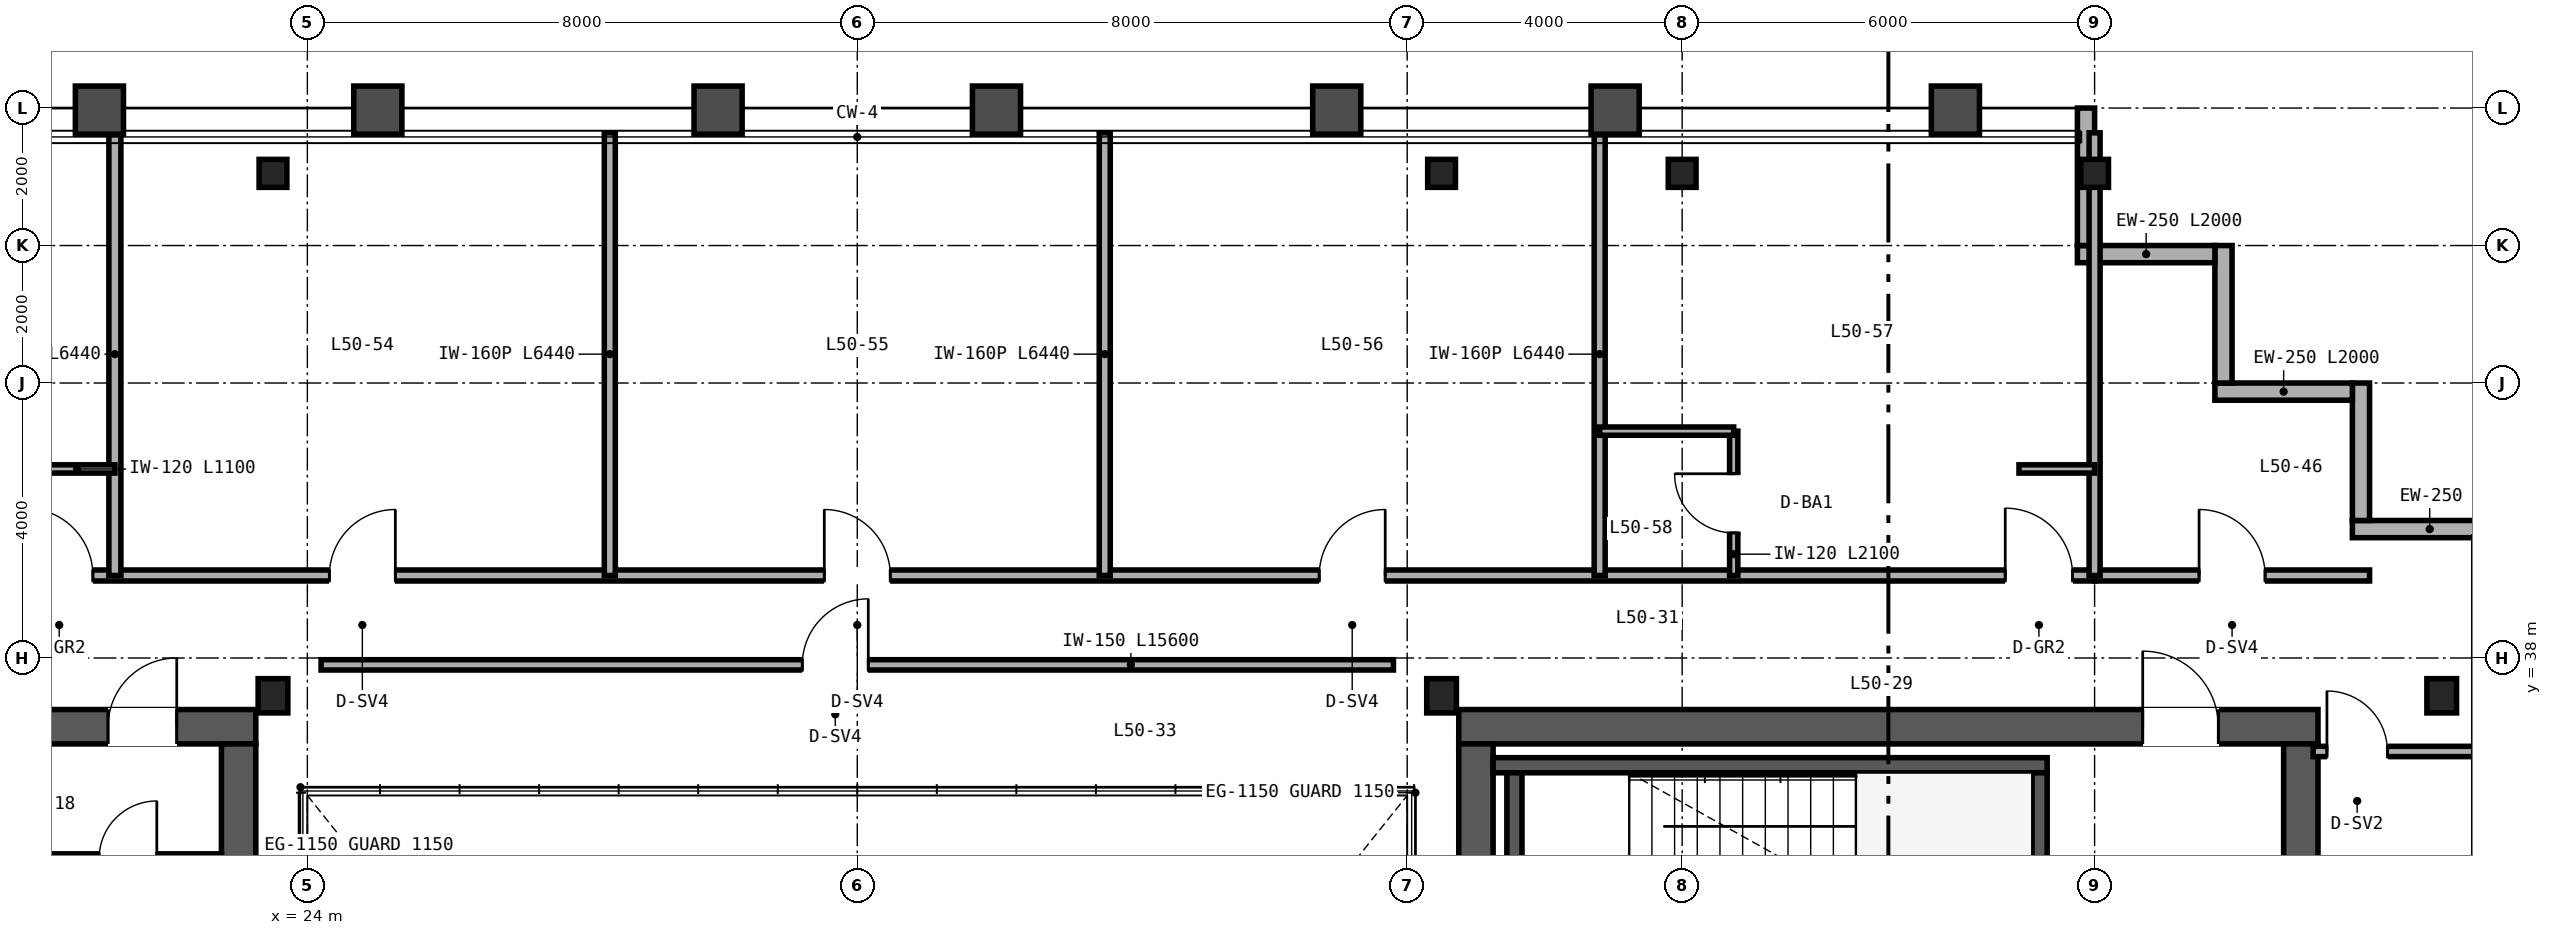
"""IFC4 building model, lengths in metres.
Left out: names, types, materials, properties, quantities, classifications, styles, units other than length and angle.
Written with IfcOpenShell. Run it as: python <this file> out.ifc"""

import sys

from ifc_helpers import new_model, si_unit, direction, frame, frame_2d, origin, origin_2d, place, context, subcontext, project, spatial, rectangle, i_section, extrude, source, transform, mapped, element, fill, save


model = new_model("IFC4")
c1 = context("Model", 3, precision=1e-05, world=origin(), true_north=direction((0.0, 1.0)))
c2 = subcontext(c1, "Body", "Model", "MODEL_VIEW")
j1 = project(units=[si_unit("LENGTHUNIT", "METRE"), si_unit("PLANEANGLEUNIT", "RADIAN")], contexts=[c1])
p1 = place(None, origin())
s1 = spatial("IfcSite", under=j1, at=p1, CompositionType="ELEMENT")
p2 = place(p1, origin())
s2 = spatial("IfcBuilding", under=s1, at=p2, CompositionType="ELEMENT")
p3 = place(p2, frame((0.0, 0.0, 199.2)))
s3 = spatial("IfcBuildingStorey", under=s2, at=p3, CompositionType="ELEMENT", Elevation=199.2)
p4 = place(p3, frame((10.75, 37.0, 0.0), z_axis=(0.0, 0.0, 1.0), x_axis=(1.0, 0.0, 0.0)))
e1 = element("IfcWall", 1, at=p4, inside=s3, PredefinedType="SHEAR", context=c2, shape_type="SweptSolid", body=[
    extrude(rectangle(XDim=12.5, YDim=0.5, at=frame_2d((6.25, 0.0))), origin(), (0.0, 0.0, 1.0), 3.37),
])
p5 = place(p4, frame((10.35, 0.0, 0.0)))
e2 = element("IfcOpeningElement", 2, at=p5, cuts=e1, PredefinedType="OPENING", context=c2, shape_type="SweptSolid", body=[
    extrude(rectangle(XDim=1.0, YDim=2.15, at=frame_2d((0.5, 1.075))), frame((0.0, 0.26, 0.0), z_axis=(0.0, -1.0, 0.0), x_axis=(1.0, 0.0, 0.0)), (0.0, 0.0, 1.0), 0.52),
])
p6 = place(p3, frame((23.0, 15.25, 0.0), z_axis=(0.0, 0.0, 1.0), x_axis=(0.0, 1.0, 0.0)))
e3 = element("IfcWall", 3, at=p6, inside=s3, PredefinedType="SHEAR", context=c2, shape_type="SweptSolid", body=[
    extrude(rectangle(XDim=21.5, YDim=0.5, at=frame_2d((10.75, 0.0))), origin(), (0.0, 0.0, 1.0), 3.37),
])
p7 = place(p3, frame((40.75, 37.0, 0.0), z_axis=(0.0, 0.0, 1.0), x_axis=(1.0, 0.0, 0.0)))
e4 = element("IfcWall", 4, at=p7, inside=s3, PredefinedType="SHEAR", context=c2, shape_type="SweptSolid", body=[
    extrude(rectangle(XDim=12.5, YDim=0.5, at=frame_2d((6.25, 0.0))), origin(), (0.0, 0.0, 1.0), 3.37),
])
p8 = place(p7, frame((9.95, 0.0, 0.0)))
e5 = element("IfcOpeningElement", 5, at=p8, cuts=e4, PredefinedType="OPENING", context=c2, shape_type="SweptSolid", body=[
    extrude(rectangle(XDim=1.1, YDim=2.15, at=frame_2d((0.55, 1.075))), frame((0.0, 0.26, 0.0), z_axis=(0.0, -1.0, 0.0), x_axis=(1.0, 0.0, 0.0)), (0.0, 0.0, 1.0), 0.52),
])
for number, where, z_axis, x_axis in (
    (6, (41.0, 15.25, 0.0), (0.0, 0.0, 1.0), (0.0, 1.0, 0.0)),
    (7, (53.0, 15.25, 0.0), (0.0, 0.0, 1.0), (0.0, 1.0, 0.0)),
):
    element("IfcWall", number, at=place(p3, frame(where, z_axis=z_axis, x_axis=x_axis)), inside=s3, PredefinedType="SHEAR", context=c2, shape_type="SweptSolid", body=[
        extrude(rectangle(XDim=21.5, YDim=0.5, at=frame_2d((10.75, 0.0))), origin(), (0.0, 0.0, 1.0), 3.37),
    ])
p9 = place(p3, frame((41.25, 36.44, 0.0), z_axis=(0.0, 0.0, 1.0), x_axis=(1.0, 0.0, 0.0)))
e8 = element("IfcWall", 8, at=p9, inside=s3, PredefinedType="SHEAR", context=c2, shape_type="SweptSolid", body=[
    extrude(rectangle(XDim=8.06, YDim=0.22, at=frame_2d((4.03, 0.0))), origin(), (0.0, 0.0, 1.0), 3.4),
])
for number, where, z_axis, x_axis in (
    (9, (41.56, 33.05, 0.0), (0.0, 0.0, 1.0), (0.0, 1.0, 0.0)),
    (10, (49.2, 33.05, 0.0), (0.0, 0.0, 1.0), (0.0, 1.0, 0.0)),
):
    element("IfcWall", number, at=place(p3, frame(where, z_axis=z_axis, x_axis=x_axis)), inside=s3, PredefinedType="SHEAR", context=c2, shape_type="SweptSolid", body=[
        extrude(rectangle(XDim=3.28, YDim=0.22, at=frame_2d((1.64, 0.0))), origin(), (0.0, 0.0, 1.0), 3.4),
    ])
m1 = source(origin(), c2, "Body", "SweptSolid", [
    extrude(i_section(OverallWidth=0.432, OverallDepth=0.498, WebThickness=0.056, FlangeThickness=0.089, FilletRadius=0.025, at=origin_2d()), origin(), (0.0, 0.0, 1.0), 3.37),
])
for number, where, z_axis, x_axis in (
    (11, (23.5, 37.45, 0.0), (0.0, 0.0, 1.0), (1.0, 0.0, 0.0)),
    (12, (40.5, 37.45, 0.0), (0.0, 0.0, 1.0), (1.0, 0.0, 0.0)),
    (13, (55.05, 37.45, 0.0), (0.0, 0.0, 1.0), (1.0, 0.0, 0.0)),
):
    element("IfcColumn", number, at=place(p3, frame(where, z_axis=z_axis, x_axis=x_axis)), inside=s3, PredefinedType="COLUMN", context=c2, shape_type="MappedRepresentation", body=[
        mapped(m1, transform((0.0, 0.0, 0.0), scale=1.0)),
    ])
m2 = source(origin(), c2, "Body", "SweptSolid", [
    extrude(i_section(OverallWidth=0.404, OverallDepth=0.407, WebThickness=0.027, FlangeThickness=0.044, FilletRadius=0.025, at=origin_2d()), origin(), (0.0, 0.0, 1.0), 3.37),
])
for number, where, z_axis, x_axis in (
    (14, (23.5, 45.05, 0.0), (0.0, 0.0, 1.0), (1.0, 0.0, 0.0)),
    (15, (40.5, 45.05, 0.0), (0.0, 0.0, 1.0), (1.0, 0.0, 0.0)),
    (16, (44.0, 45.05, 0.0), (0.0, 0.0, 1.0), (1.0, 0.0, 0.0)),
    (17, (50.0, 45.05, 0.0), (0.0, 0.0, 1.0), (1.0, 0.0, 0.0)),
):
    element("IfcColumn", number, at=place(p3, frame(where, z_axis=z_axis, x_axis=x_axis)), inside=s3, PredefinedType="COLUMN", context=c2, shape_type="MappedRepresentation", body=[
        mapped(m2, transform((0.0, 0.0, 0.0), scale=1.0)),
    ])
p10 = place(p3, frame((56.0, 39.875, 0.0), z_axis=(0.0, 0.0, 1.0), x_axis=(-1.0, 0.0, 0.0)))
e18 = element("IfcWall", 18, at=p10, inside=s3, PredefinedType="SOLIDWALL", context=c2, shape_type="SweptSolid", body=[
    extrude(rectangle(XDim=2.25, YDim=0.25, at=frame_2d((1.125, 0.0))), origin(), (0.0, 0.0, 1.0), 3.37),
])
for number, where, z_axis, x_axis in (
    (19, (53.875, 40.0, 0.0), (0.0, 0.0, 1.0), (0.0, 1.0, 0.0)),
    (20, (53.75, 41.875, 0.0), (0.0, 0.0, 1.0), (-1.0, 0.0, 0.0)),
    (21, (51.875, 42.0, 0.0), (0.0, 0.0, 1.0), (0.0, 1.0, 0.0)),
    (22, (51.75, 43.875, 0.0), (0.0, 0.0, 1.0), (-1.0, 0.0, 0.0)),
):
    element("IfcWall", number, at=place(p3, frame(where, z_axis=z_axis, x_axis=x_axis)), inside=s3, PredefinedType="SOLIDWALL", context=c2, shape_type="SweptSolid", body=[
        extrude(rectangle(XDim=2.0, YDim=0.25, at=frame_2d((1.0, 0.0))), origin(), (0.0, 0.0, 1.0), 3.37),
    ])
p11 = place(p3, frame((49.875, 44.0, 0.0), z_axis=(0.0, 0.0, 1.0), x_axis=(0.0, 1.0, 0.0)))
e23 = element("IfcWall", 23, at=p11, inside=s3, PredefinedType="SOLIDWALL", context=c2, shape_type="SweptSolid", body=[
    extrude(rectangle(XDim=2.0, YDim=0.25, at=frame_2d((1.0, 0.0))), origin(), (0.0, 0.0, 1.0), 2.677),
])
p12 = place(p3, frame((20.12, 35.08, 0.0), z_axis=(0.0, 0.0, 1.0), x_axis=(1.0, 0.0, 0.0)))
e24 = element("IfcWall", 24, at=p12, inside=s3, PredefinedType="PARTITIONING", context=c2, shape_type="SweptSolid", body=[
    extrude(rectangle(XDim=2.63, YDim=0.142, at=frame_2d((1.315, 0.0))), origin(), (0.0, 0.0, 1.0), 3.37),
])
p13 = place(p12, frame((0.85, 0.0, 0.0)))
e25 = element("IfcOpeningElement", 25, at=p13, cuts=e24, PredefinedType="OPENING", context=c2, shape_type="SweptSolid", body=[
    extrude(rectangle(XDim=0.84, YDim=2.1, at=frame_2d((0.42, 1.05))), frame((0.0, 0.081, 0.0), z_axis=(0.0, -1.0, 0.0), x_axis=(1.0, 0.0, 0.0)), (0.0, 0.0, 1.0), 0.162),
])
p14 = place(p3, frame((24.2, 37.9, 0.0), z_axis=(0.0, 0.0, 1.0), x_axis=(1.0, 0.0, 0.0)))
e26 = element("IfcWall", 26, at=p14, inside=s3, PredefinedType="PARTITIONING", context=c2, shape_type="SweptSolid", body=[
    extrude(rectangle(XDim=15.6, YDim=0.15, at=frame_2d((7.8, 0.0))), origin(), (0.0, 0.0, 1.0), 3.37),
])
p15 = place(p14, frame((7.0, 0.0, 0.0)))
e27 = element("IfcOpeningElement", 27, at=p15, cuts=e26, PredefinedType="OPENING", context=c2, shape_type="SweptSolid", body=[
    extrude(rectangle(XDim=0.96, YDim=2.15, at=frame_2d((0.48, 1.075))), frame((0.0, 0.085, 0.0), z_axis=(0.0, -1.0, 0.0), x_axis=(1.0, 0.0, 0.0)), (0.0, 0.0, 1.0), 0.17),
])
p16 = place(p3, frame((53.18, 36.64, 0.0), z_axis=(0.0, 0.0, 1.0), x_axis=(1.0, 0.0, 0.0)))
e28 = element("IfcWall", 28, at=p16, inside=s3, PredefinedType="PARTITIONING", context=c2, shape_type="SweptSolid", body=[
    extrude(rectangle(XDim=2.66, YDim=0.15, at=frame_2d((1.33, 0.0))), origin(), (0.0, 0.0, 1.0), 2.753),
])
p17 = place(p16, frame((0.2, 0.0, 0.0)))
e29 = element("IfcOpeningElement", 29, at=p17, cuts=e28, PredefinedType="OPENING", context=c2, shape_type="SweptSolid", body=[
    extrude(rectangle(XDim=0.88, YDim=2.15, at=frame_2d((0.44, 1.075))), frame((0.0, 0.085, 0.0), z_axis=(0.0, -1.0, 0.0), x_axis=(1.0, 0.0, 0.0)), (0.0, 0.0, 1.0), 0.17),
])
p18 = place(p3, frame((50.0, 39.2, 0.0), z_axis=(0.0, 0.0, 1.0), x_axis=(1.0, 0.0, 0.0)))
e30 = element("IfcWall", 30, at=p18, inside=s3, PredefinedType="PARTITIONING", context=c2, shape_type="SweptSolid", body=[
    extrude(rectangle(XDim=4.0, YDim=0.16, at=frame_2d((2.0, 0.0))), origin(), (0.0, 0.0, 1.0), 3.37),
])
p19 = place(p18, frame((1.52, 0.0, 0.0)))
e31 = element("IfcOpeningElement", 31, at=p19, cuts=e30, PredefinedType="OPENING", context=c2, shape_type="SweptSolid", body=[
    extrude(rectangle(XDim=0.96, YDim=2.15, at=frame_2d((0.48, 1.075))), frame((0.0, 0.09, 0.0), z_axis=(0.0, -1.0, 0.0), x_axis=(1.0, 0.0, 0.0)), (0.0, 0.0, 1.0), 0.18),
])
p20 = place(p3, frame((14.0, 39.2, 0.0), z_axis=(0.0, 0.0, 1.0), x_axis=(1.0, 0.0, 0.0)))
e32 = element("IfcWall", 32, at=p20, inside=s3, PredefinedType="PARTITIONING", context=c2, shape_type="SweptSolid", body=[
    extrude(rectangle(XDim=36.0, YDim=0.16, at=frame_2d((18.0, 0.0))), origin(), (0.0, 0.0, 1.0), 2.913),
])
p21 = place(p20, frame((5.9, 0.0, 0.0)))
e33 = element("IfcOpeningElement", 33, at=p21, cuts=e32, PredefinedType="OPENING", context=c2, shape_type="SweptSolid", body=[
    extrude(rectangle(XDim=0.98, YDim=2.2, at=frame_2d((0.49, 1.1))), frame((0.0, 0.09, 0.0), z_axis=(0.0, -1.0, 0.0), x_axis=(1.0, 0.0, 0.0)), (0.0, 0.0, 1.0), 0.18),
])
p22 = place(p20, frame((10.32, 0.0, 0.0)))
e34 = element("IfcOpeningElement", 34, at=p22, cuts=e32, PredefinedType="OPENING", context=c2, shape_type="SweptSolid", body=[
    extrude(rectangle(XDim=0.96, YDim=2.15, at=frame_2d((0.48, 1.075))), frame((0.0, 0.09, 0.0), z_axis=(0.0, -1.0, 0.0), x_axis=(1.0, 0.0, 0.0)), (0.0, 0.0, 1.0), 0.18),
])
p23 = place(p20, frame((17.52, 0.0, 0.0)))
e35 = element("IfcOpeningElement", 35, at=p23, cuts=e32, PredefinedType="OPENING", context=c2, shape_type="SweptSolid", body=[
    extrude(rectangle(XDim=0.96, YDim=2.15, at=frame_2d((0.48, 1.075))), frame((0.0, 0.09, 0.0), z_axis=(0.0, -1.0, 0.0), x_axis=(1.0, 0.0, 0.0)), (0.0, 0.0, 1.0), 0.18),
])
p24 = place(p20, frame((24.72, 0.0, 0.0)))
e36 = element("IfcOpeningElement", 36, at=p24, cuts=e32, PredefinedType="OPENING", context=c2, shape_type="SweptSolid", body=[
    extrude(rectangle(XDim=0.96, YDim=2.15, at=frame_2d((0.48, 1.075))), frame((0.0, 0.09, 0.0), z_axis=(0.0, -1.0, 0.0), x_axis=(1.0, 0.0, 0.0)), (0.0, 0.0, 1.0), 0.18),
])
p25 = place(p20, frame((34.7, 0.0, 0.0)))
e37 = element("IfcOpeningElement", 37, at=p25, cuts=e32, PredefinedType="OPENING", context=c2, shape_type="SweptSolid", body=[
    extrude(rectangle(XDim=0.98, YDim=2.2, at=frame_2d((0.49, 1.1))), frame((0.0, 0.09, 0.0), z_axis=(0.0, -1.0, 0.0), x_axis=(1.0, 0.0, 0.0)), (0.0, 0.0, 1.0), 0.18),
])
p26 = place(p3, frame((50.0, 39.2, 0.0), z_axis=(0.0, 0.0, 1.0), x_axis=(0.0, 1.0, 0.0)))
e38 = element("IfcWall", 38, at=p26, inside=s3, PredefinedType="PARTITIONING", context=c2, shape_type="SweptSolid", body=[
    extrude(rectangle(XDim=6.44, YDim=0.16, at=frame_2d((3.22, 0.0))), origin(), (0.0, 0.0, 1.0), 2.677),
])
p27 = place(p3, frame((21.2, 39.2, 0.0), z_axis=(0.0, 0.0, 1.0), x_axis=(0.0, 1.0, 0.0)))
e39 = element("IfcWall", 39, at=p27, inside=s3, PredefinedType="PARTITIONING", context=c2, shape_type="SweptSolid", body=[
    extrude(rectangle(XDim=6.44, YDim=0.175, at=frame_2d((3.22, 0.0))), origin(), (0.0, 0.0, 1.0), 2.833),
])
p28 = place(p3, frame((20.1, 40.75, 0.0), z_axis=(0.0, 0.0, 1.0), x_axis=(1.0, 0.0, 0.0)))
e40 = element("IfcWall", 40, at=p28, inside=s3, PredefinedType="PARTITIONING", context=c2, shape_type="SweptSolid", body=[
    extrude(rectangle(XDim=1.1, YDim=0.12, at=frame_2d((0.55, 0.0))), origin(), (0.0, 0.0, 1.0), 3.37),
])
for number, where, z_axis, x_axis in (
    (41, (28.4, 39.2, 0.0), (0.0, 0.0, 1.0), (0.0, 1.0, 0.0)),
    (42, (35.6, 39.2, 0.0), (0.0, 0.0, 1.0), (0.0, 1.0, 0.0)),
):
    element("IfcWall", number, at=place(p3, frame(where, z_axis=z_axis, x_axis=x_axis)), inside=s3, PredefinedType="PARTITIONING", context=c2, shape_type="SweptSolid", body=[
        extrude(rectangle(XDim=6.44, YDim=0.16, at=frame_2d((3.22, 0.0))), origin(), (0.0, 0.0, 1.0), 2.443),
    ])
p29 = place(p3, frame((42.8, 39.2, 0.0), z_axis=(0.0, 0.0, 1.0), x_axis=(0.0, 1.0, 0.0)))
e43 = element("IfcWall", 43, at=p29, inside=s3, PredefinedType="PARTITIONING", context=c2, shape_type="SweptSolid", body=[
    extrude(rectangle(XDim=6.44, YDim=0.16, at=frame_2d((3.22, 0.0))), origin(), (0.0, 0.0, 1.0), 2.833),
])
p30 = place(p3, frame((44.75, 39.2, 0.0), z_axis=(0.0, 0.0, 1.0), x_axis=(0.0, 1.0, 0.0)))
e44 = element("IfcWall", 44, at=p30, inside=s3, PredefinedType="PARTITIONING", context=c2, shape_type="SweptSolid", body=[
    extrude(rectangle(XDim=2.1, YDim=0.12, at=frame_2d((1.05, 0.0))), origin(), (0.0, 0.0, 1.0), 3.37),
])
p31 = place(p30, frame((0.62, 0.0, 0.0)))
e45 = element("IfcOpeningElement", 45, at=p31, cuts=e44, PredefinedType="OPENING", context=c2, shape_type="SweptSolid", body=[
    extrude(rectangle(XDim=0.86, YDim=2.1, at=frame_2d((0.43, 1.05))), frame((0.0, 0.07, 0.0), z_axis=(0.0, -1.0, 0.0), x_axis=(1.0, 0.0, 0.0)), (0.0, 0.0, 1.0), 0.14),
])
p32 = place(p3, frame((42.8, 41.3, 0.0), z_axis=(0.0, 0.0, 1.0), x_axis=(1.0, 0.0, 0.0)))
e46 = element("IfcWall", 46, at=p32, inside=s3, PredefinedType="PARTITIONING", context=c2, shape_type="SweptSolid", body=[
    extrude(rectangle(XDim=1.95, YDim=0.12, at=frame_2d((0.975, 0.0))), origin(), (0.0, 0.0, 1.0), 3.37),
])
p33 = place(p3, frame((48.9, 40.75, 0.0), z_axis=(0.0, 0.0, 1.0), x_axis=(1.0, 0.0, 0.0)))
e47 = element("IfcWall", 47, at=p33, inside=s3, PredefinedType="PARTITIONING", context=c2, shape_type="SweptSolid", body=[
    extrude(rectangle(XDim=1.1, YDim=0.12, at=frame_2d((0.55, 0.0))), origin(), (0.0, 0.0, 1.0), 3.37),
])
m3 = source(origin(), c2, "Body", "SweptSolid", [
    extrude(rectangle(XDim=1.0, YDim=2.15, at=frame_2d((0.5, 1.075))), frame((0.0, 0.025, 0.0), z_axis=(0.0, -1.0, 0.0), x_axis=(1.0, 0.0, 0.0)), (0.0, 0.0, 1.0), 0.05),
])
p34 = place(p5, origin())
e48 = element("IfcDoor", 48, at=p34, inside=s3, OperationType="SINGLE_SWING_RIGHT", PredefinedType="DOOR", context=c2, shape_type="MappedRepresentation", body=[
    mapped(m3, transform((0.0, 0.0, 0.0), scale=1.0)),
])
fill(e2, e48)
m4 = source(origin(), c2, "Body", "SweptSolid", [
    extrude(rectangle(XDim=1.1, YDim=2.15, at=frame_2d((0.55, 1.075))), frame((0.0, 0.025, 0.0), z_axis=(0.0, -1.0, 0.0), x_axis=(1.0, 0.0, 0.0)), (0.0, 0.0, 1.0), 0.05),
])
p35 = place(p8, origin())
e49 = element("IfcDoor", 49, at=p35, inside=s3, OperationType="SINGLE_SWING_LEFT", PredefinedType="DOOR", context=c2, shape_type="MappedRepresentation", body=[
    mapped(m4, transform((0.0, 0.0, 0.0), scale=1.0)),
])
fill(e5, e49)
m5 = source(origin(), c2, "Body", "SweptSolid", [
    extrude(rectangle(XDim=0.96, YDim=2.15, at=frame_2d((0.48, 1.075))), frame((0.0, 0.025, 0.0), z_axis=(0.0, -1.0, 0.0), x_axis=(1.0, 0.0, 0.0)), (0.0, 0.0, 1.0), 0.05),
])
p36 = place(p15, origin())
e50 = element("IfcDoor", 50, at=p36, inside=s3, OperationType="SINGLE_SWING_RIGHT", PredefinedType="DOOR", context=c2, shape_type="MappedRepresentation", body=[
    mapped(m5, transform((0.0, 0.0, 0.0), scale=1.0)),
])
fill(e27, e50)
m6 = source(origin(), c2, "Body", "SweptSolid", [
    extrude(rectangle(XDim=0.88, YDim=2.15, at=frame_2d((0.44, 1.075))), frame((0.0, 0.025, 0.0), z_axis=(0.0, -1.0, 0.0), x_axis=(1.0, 0.0, 0.0)), (0.0, 0.0, 1.0), 0.05),
])
p37 = place(p17, origin())
e51 = element("IfcDoor", 51, at=p37, inside=s3, OperationType="SINGLE_SWING_LEFT", PredefinedType="DOOR", context=c2, shape_type="MappedRepresentation", body=[
    mapped(m6, transform((0.0, 0.0, 0.0), scale=1.0)),
])
fill(e29, e51)
p38 = place(p19, origin())
e52 = element("IfcDoor", 52, at=p38, inside=s3, OperationType="SINGLE_SWING_LEFT", PredefinedType="DOOR", context=c2, shape_type="MappedRepresentation", body=[
    mapped(m5, transform((0.0, 0.0, 0.0), scale=1.0)),
])
fill(e31, e52)
m7 = source(origin(), c2, "Body", "SweptSolid", [
    extrude(rectangle(XDim=0.86, YDim=2.1, at=frame_2d((0.43, 1.05))), frame((0.0, 0.025, 0.0), z_axis=(0.0, -1.0, 0.0), x_axis=(1.0, 0.0, 0.0)), (0.0, 0.0, 1.0), 0.05),
])
p39 = place(p31, origin())
e53 = element("IfcDoor", 53, at=p39, inside=s3, OperationType="SINGLE_SWING_RIGHT", PredefinedType="DOOR", context=c2, shape_type="MappedRepresentation", body=[
    mapped(m7, transform((0.0, 0.0, 0.0), scale=1.0)),
])
fill(e45, e53)
m8 = source(origin(), c2, "Body", "SweptSolid", [
    extrude(rectangle(XDim=0.98, YDim=2.2, at=frame_2d((0.49, 1.1))), frame((0.0, 0.025, 0.0), z_axis=(0.0, -1.0, 0.0), x_axis=(1.0, 0.0, 0.0)), (0.0, 0.0, 1.0), 0.05),
])
p40 = place(p21, origin())
e54 = element("IfcDoor", 54, at=p40, inside=s3, OperationType="SINGLE_SWING_LEFT", PredefinedType="DOOR", context=c2, shape_type="MappedRepresentation", body=[
    mapped(m8, transform((0.0, 0.0, 0.0), scale=1.0)),
])
fill(e33, e54)
p41 = place(p22, origin())
e55 = element("IfcDoor", 55, at=p41, inside=s3, OperationType="SINGLE_SWING_RIGHT", PredefinedType="DOOR", context=c2, shape_type="MappedRepresentation", body=[
    mapped(m5, transform((0.0, 0.0, 0.0), scale=1.0)),
])
fill(e34, e55)
p42 = place(p23, origin())
e56 = element("IfcDoor", 56, at=p42, inside=s3, OperationType="SINGLE_SWING_LEFT", PredefinedType="DOOR", context=c2, shape_type="MappedRepresentation", body=[
    mapped(m5, transform((0.0, 0.0, 0.0), scale=1.0)),
])
fill(e35, e56)
p43 = place(p24, origin())
e57 = element("IfcDoor", 57, at=p43, inside=s3, OperationType="SINGLE_SWING_RIGHT", PredefinedType="DOOR", context=c2, shape_type="MappedRepresentation", body=[
    mapped(m5, transform((0.0, 0.0, 0.0), scale=1.0)),
])
fill(e36, e57)
p44 = place(p25, origin())
e58 = element("IfcDoor", 58, at=p44, inside=s3, OperationType="SINGLE_SWING_LEFT", PredefinedType="DOOR", context=c2, shape_type="MappedRepresentation", body=[
    mapped(m8, transform((0.0, 0.0, 0.0), scale=1.0)),
])
fill(e37, e58)
save(model, sys.argv[1])
